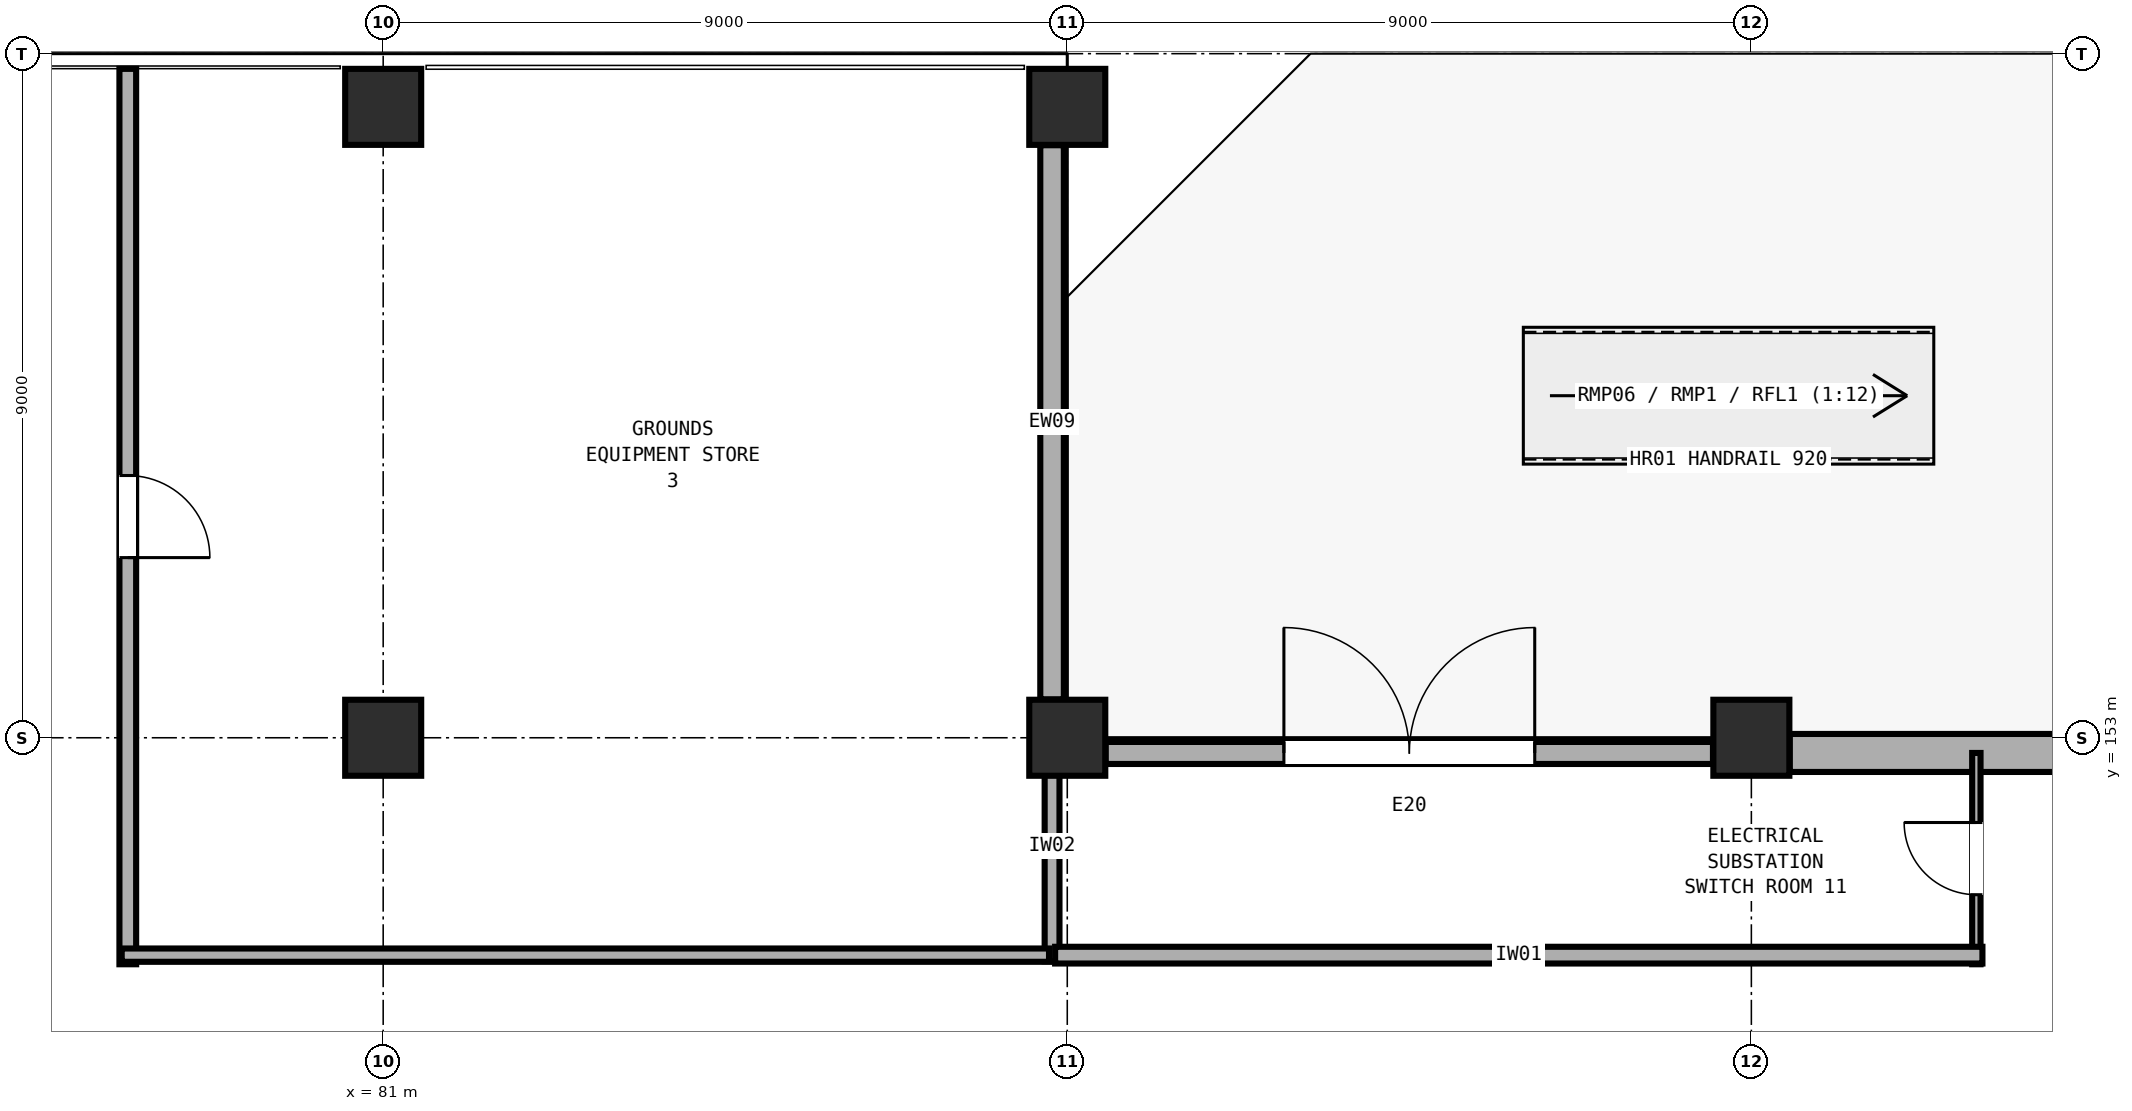
"""IFC4 building model, lengths in metres.
Left out: names, types, materials, properties, quantities, classifications, styles, units other than length and angle.
Written with IfcOpenShell. Run it as: python <this file> out.ifc"""

import sys

from ifc_helpers import new_model, si_unit, direction, frame, frame_2d, origin, origin_2d, place, context, subcontext, project, spatial, rectangle, extrude, element, fill, save


model = new_model("IFC4")
c1 = context("Model", 3, precision=1e-05, world=origin(), true_north=direction((0.0, 1.0)))
c2 = subcontext(c1, "Body", "Model", "MODEL_VIEW")
j1 = project(units=[si_unit("LENGTHUNIT", "METRE"), si_unit("PLANEANGLEUNIT", "RADIAN")], contexts=[c1])
p1 = place(None, origin())
s1 = spatial("IfcSite", under=j1, at=p1, CompositionType="ELEMENT")
p2 = place(p1, origin())
s2 = spatial("IfcBuilding", under=s1, at=p2, CompositionType="ELEMENT")
p3 = place(p2, origin())
s3 = spatial("IfcBuildingStorey", under=s2, at=p3, CompositionType="ELEMENT", Elevation=0.0)
for number, where, z_axis, x_axis in (
    (1, (81.0, 153.0, 0.0), (0.0, 0.0, 1.0), (1.0, 0.0, 0.0)),
    (2, (81.0, 161.3, 0.0), (0.0, 0.0, 1.0), (1.0, 0.0, 0.0)),
    (3, (90.0, 153.0, 0.0), (0.0, 0.0, 1.0), (1.0, 0.0, 0.0)),
    (4, (90.0, 161.3, 0.0), (0.0, 0.0, 1.0), (1.0, 0.0, 0.0)),
    (5, (99.0, 153.0, 0.0), (0.0, 0.0, 1.0), (1.0, 0.0, 0.0)),
):
    element("IfcColumn", number, at=place(p3, frame(where, z_axis=z_axis, x_axis=x_axis)), inside=s3, PredefinedType="COLUMN", context=c2, shape_type="SweptSolid", body=[
        extrude(rectangle(XDim=1.0, YDim=1.0, at=origin_2d()), origin(), (0.0, 0.0, 1.0), 4.8),
    ])
p4 = place(p3, frame((72.505, 161.8, 0.0), z_axis=(0.0, 0.0, 1.0), x_axis=(1.0, 0.0, 0.0)))
e6 = element("IfcWall", 6, at=p4, inside=s3, PredefinedType="SOLIDWALL", context=c2, shape_type="SweptSolid", body=[
    extrude(rectangle(XDim=7.99, YDim=0.5, at=frame_2d((3.995, 0.0))), origin(), (0.0, 0.0, 1.0), 3.58),
])
p5 = place(p4, frame((0.985, 0.0, 0.0)))
e7 = element("IfcOpeningElement", 7, at=p5, cuts=e6, PredefinedType="OPENING", context=c2, shape_type="SweptSolid", body=[
    extrude(rectangle(XDim=3.4, YDim=2.55, at=frame_2d((1.7, 1.275))), frame((0.0, 0.26, 0.0), z_axis=(0.0, -1.0, 0.0), x_axis=(1.0, 0.0, 0.0)), (0.0, 0.0, 1.0), 0.52),
])
p6 = place(p3, frame((81.505, 161.8, 0.0), z_axis=(0.0, 0.0, 1.0), x_axis=(1.0, 0.0, 0.0)))
e8 = element("IfcWall", 8, at=p6, inside=s3, PredefinedType="SOLIDWALL", context=c2, shape_type="SweptSolid", body=[
    extrude(rectangle(XDim=7.99, YDim=0.48, at=frame_2d((3.995, 0.0))), origin(), (0.0, 0.0, 1.0), 3.58),
])
p7 = place(p6, frame((2.245, 0.0, 0.0)))
e9 = element("IfcOpeningElement", 9, at=p7, cuts=e8, PredefinedType="OPENING", context=c2, shape_type="SweptSolid", body=[
    extrude(rectangle(XDim=3.5, YDim=2.6, at=frame_2d((1.75, 1.3))), frame((0.0, 0.25, 0.0), z_axis=(0.0, -1.0, 0.0), x_axis=(1.0, 0.0, 0.0)), (0.0, 0.0, 1.0), 0.5),
])
p8 = place(p3, frame((89.8, 160.795, 0.0), z_axis=(0.0, 0.0, 1.0), x_axis=(0.0, -1.0, 0.0)))
e10 = element("IfcWall", 10, at=p8, inside=s3, PredefinedType="SOLIDWALL", context=c2, shape_type="SweptSolid", body=[
    extrude(rectangle(XDim=7.29, YDim=0.31, at=frame_2d((3.645, 0.0))), origin(), (0.0, 0.0, 1.0), 3.58),
])
p9 = place(p3, frame((90.505, 152.8, 0.0), z_axis=(0.0, 0.0, 1.0), x_axis=(1.0, 0.0, 0.0)))
e11 = element("IfcWall", 11, at=p9, inside=s3, PredefinedType="SOLIDWALL", context=c2, shape_type="SweptSolid", body=[
    extrude(rectangle(XDim=7.99, YDim=0.29, at=frame_2d((3.995, 0.0))), origin(), (0.0, 0.0, 1.0), 3.58),
])
p10 = place(p9, frame((2.345, 0.0, 0.0)))
e12 = element("IfcOpeningElement", 12, at=p10, cuts=e11, PredefinedType="OPENING", context=c2, shape_type="SweptSolid", body=[
    extrude(rectangle(XDim=3.3, YDim=2.55, at=frame_2d((1.65, 1.275))), frame((0.0, 0.155, 0.0), z_axis=(0.0, -1.0, 0.0), x_axis=(1.0, 0.0, 0.0)), (0.0, 0.0, 1.0), 0.31),
])
p11 = place(p3, frame((99.505, 152.8, 0.0), z_axis=(0.0, 0.0, 1.0), x_axis=(1.0, 0.0, 0.0)))
e13 = element("IfcWall", 13, at=p11, inside=s3, PredefinedType="SOLIDWALL", context=c2, shape_type="SweptSolid", body=[
    extrude(rectangle(XDim=7.99, YDim=0.5, at=frame_2d((3.995, 0.0))), origin(), (0.0, 0.0, 1.0), 3.58),
])
p12 = place(p3, frame((77.64, 161.8, 0.0), z_axis=(0.0, 0.0, 1.0), x_axis=(0.0, -1.0, 0.0)))
e14 = element("IfcWall", 14, at=p12, inside=s3, PredefinedType="PARTITIONING", context=c2, shape_type="SweptSolid", body=[
    extrude(rectangle(XDim=11.78, YDim=0.22, at=frame_2d((5.89, 0.0))), origin(), (0.0, 0.0, 1.0), 3.28),
])
p13 = place(p12, frame((5.35, 0.0, 0.0)))
e15 = element("IfcOpeningElement", 15, at=p13, cuts=e14, PredefinedType="OPENING", context=c2, shape_type="SweptSolid", body=[
    extrude(rectangle(XDim=1.08, YDim=2.18, at=frame_2d((0.54, 1.09))), frame((0.0, 0.12, 0.0), z_axis=(0.0, -1.0, 0.0), x_axis=(1.0, 0.0, 0.0)), (0.0, 0.0, 1.0), 0.24),
])
p14 = place(p3, frame((89.8, 153.08, 0.0), z_axis=(0.0, 0.0, 1.0), x_axis=(0.0, -1.0, 0.0)))
e16 = element("IfcWall", 16, at=p14, inside=s3, PredefinedType="PARTITIONING", context=c2, shape_type="SweptSolid", body=[
    extrude(rectangle(XDim=3.02, YDim=0.195, at=frame_2d((1.51, 0.0))), origin(), (0.0, 0.0, 1.0), 3.28),
])
p15 = place(p3, frame((89.76, 150.14, 0.0), z_axis=(0.0, 0.0, 1.0), x_axis=(-1.0, 0.0, 0.0)))
e17 = element("IfcWall", 17, at=p15, inside=s3, PredefinedType="PARTITIONING", context=c2, shape_type="SweptSolid", body=[
    extrude(rectangle(XDim=12.2, YDim=0.175, at=frame_2d((6.1, 0.0))), origin(), (0.0, 0.0, 1.0), 3.28),
])
p16 = place(p3, frame((101.96, 150.02, 0.0), z_axis=(0.0, 0.0, 1.0), x_axis=(0.0, 1.0, 0.0)))
e18 = element("IfcWall", 18, at=p16, inside=s3, PredefinedType="PARTITIONING", context=c2, shape_type="SweptSolid", body=[
    extrude(rectangle(XDim=2.78, YDim=0.11, at=frame_2d((1.39, 0.0))), origin(), (0.0, 0.0, 1.0), 3.28),
])
p17 = place(p16, frame((0.915, 0.0, 0.0)))
e19 = element("IfcOpeningElement", 19, at=p17, cuts=e18, PredefinedType="OPENING", context=c2, shape_type="SweptSolid", body=[
    extrude(rectangle(XDim=0.95, YDim=2.18, at=frame_2d((0.475, 1.09))), frame((0.0, 0.065, 0.0), z_axis=(0.0, -1.0, 0.0), x_axis=(1.0, 0.0, 0.0)), (0.0, 0.0, 1.0), 0.13),
])
p18 = place(p3, frame((102.04, 150.14, 0.0), z_axis=(0.0, 0.0, 1.0), x_axis=(-1.0, 0.0, 0.0)))
e20 = element("IfcWall", 20, at=p18, inside=s3, PredefinedType="PARTITIONING", context=c2, shape_type="SweptSolid", body=[
    extrude(rectangle(XDim=12.2, YDim=0.22, at=frame_2d((6.1, 0.0))), origin(), (0.0, 0.0, 1.0), 3.28),
])
p19 = place(p7, origin())
e21 = element("IfcDoor", 21, at=p19, inside=s3, OperationType="DOUBLE_DOOR_SINGLE_SWING", PredefinedType="DOOR", context=c2, shape_type="SweptSolid", body=[
    extrude(rectangle(XDim=3.5, YDim=2.6, at=frame_2d((1.75, 1.3))), frame((0.0, 0.025, 0.0), z_axis=(0.0, -1.0, 0.0), x_axis=(1.0, 0.0, 0.0)), (0.0, 0.0, 1.0), 0.05),
])
fill(e9, e21)
p20 = place(p5, origin())
e22 = element("IfcDoor", 22, at=p20, inside=s3, OperationType="DOUBLE_DOOR_SINGLE_SWING", PredefinedType="DOOR", context=c2, shape_type="SweptSolid", body=[
    extrude(rectangle(XDim=3.4, YDim=2.55, at=frame_2d((1.7, 1.275))), frame((0.0, 0.025, 0.0), z_axis=(0.0, -1.0, 0.0), x_axis=(1.0, 0.0, 0.0)), (0.0, 0.0, 1.0), 0.05),
])
fill(e7, e22)
p21 = place(p10, origin())
e23 = element("IfcDoor", 23, at=p21, inside=s3, OperationType="DOUBLE_DOOR_SINGLE_SWING", PredefinedType="DOOR", context=c2, shape_type="SweptSolid", body=[
    extrude(rectangle(XDim=3.3, YDim=2.55, at=frame_2d((1.65, 1.275))), frame((0.0, 0.025, 0.0), z_axis=(0.0, -1.0, 0.0), x_axis=(1.0, 0.0, 0.0)), (0.0, 0.0, 1.0), 0.05),
])
fill(e12, e23)
p22 = place(p13, origin())
e24 = element("IfcDoor", 24, at=p22, inside=s3, OperationType="SINGLE_SWING_RIGHT", PredefinedType="DOOR", context=c2, shape_type="SweptSolid", body=[
    extrude(rectangle(XDim=1.08, YDim=2.18, at=frame_2d((0.54, 1.09))), frame((0.0, 0.025, 0.0), z_axis=(0.0, -1.0, 0.0), x_axis=(1.0, 0.0, 0.0)), (0.0, 0.0, 1.0), 0.05),
])
fill(e15, e24)
p23 = place(p17, origin())
e25 = element("IfcDoor", 25, at=p23, inside=s3, OperationType="SINGLE_SWING_RIGHT", PredefinedType="DOOR", context=c2, shape_type="SweptSolid", body=[
    extrude(rectangle(XDim=0.95, YDim=2.18, at=frame_2d((0.475, 1.09))), frame((0.0, 0.025, 0.0), z_axis=(0.0, -1.0, 0.0), x_axis=(1.0, 0.0, 0.0)), (0.0, 0.0, 1.0), 0.05),
])
fill(e19, e25)
save(model, sys.argv[1])
